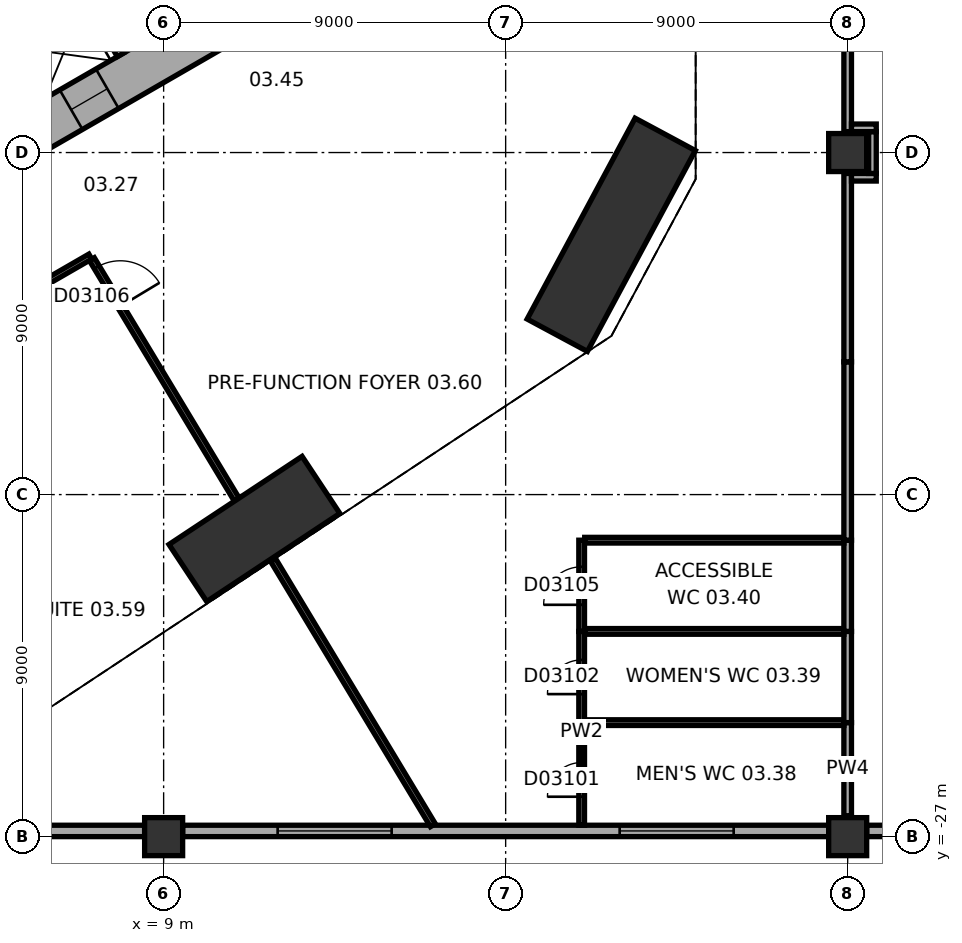
"""IFC4 building model, lengths in metres.
Left out: names, types, materials, properties, quantities, classifications, styles, units other than length and angle.
Written with IfcOpenShell. Run it as: python <this file> out.ifc"""

import sys

from ifc_helpers import new_model, si_unit, direction, frame, frame_2d, origin, origin_2d, place, context, subcontext, project, spatial, rectangle, extrude, element, fill, save


model = new_model("IFC4")
c1 = context("Model", 3, precision=1e-05, world=origin(), true_north=direction((0.0, 1.0)))
c2 = subcontext(c1, "Body", "Model", "MODEL_VIEW")
j1 = project(units=[si_unit("LENGTHUNIT", "METRE"), si_unit("PLANEANGLEUNIT", "RADIAN")], contexts=[c1])
p1 = place(None, origin())
s1 = spatial("IfcSite", under=j1, at=p1, CompositionType="ELEMENT")
p2 = place(p1, origin())
s2 = spatial("IfcBuilding", under=s1, at=p2, CompositionType="ELEMENT")
p3 = place(p2, frame((0.0, 0.0, 21.0)))
s3 = spatial("IfcBuildingStorey", under=s2, at=p3, CompositionType="ELEMENT", Elevation=21.0)
p4 = place(p3, frame((11.389, -18.905, 0.0), z_axis=(0.0, 0.0, 1.0), x_axis=(0.833880042151, 0.551945717714, 0.0)))
e1 = element("IfcColumn", 1, at=p4, inside=s3, PredefinedType="COLUMN", context=c2, shape_type="SweptSolid", body=[
    extrude(rectangle(XDim=4.2, YDim=1.8, at=origin_2d()), origin(), (0.0, 0.0, 1.0), 8.0),
])
p5 = place(p3, frame((20.779, -11.165, 0.0), z_axis=(0.0, 0.0, 1.0), x_axis=(0.473322742071, 0.880889086003, 0.0)))
e2 = element("IfcColumn", 2, at=p5, inside=s3, PredefinedType="COLUMN", context=c2, shape_type="SweptSolid", body=[
    extrude(rectangle(XDim=6.0, YDim=1.8, at=origin_2d()), origin(), (0.0, 0.0, 1.0), 8.0),
])
for number, where, z_axis, x_axis in (
    (3, (9.0, -27.0, 0.0), (0.0, 0.0, 1.0), (1.0, 0.0, 0.0)),
    (4, (27.0, -27.0, 0.0), (0.0, 0.0, 1.0), (1.0, 0.0, 0.0)),
    (5, (27.0, -9.0, 0.0), (0.0, 0.0, 1.0), (1.0, 0.0, 0.0)),
):
    element("IfcColumn", number, at=place(p3, frame(where, z_axis=z_axis, x_axis=x_axis)), inside=s3, PredefinedType="COLUMN", context=c2, shape_type="SweptSolid", body=[
        extrude(rectangle(XDim=1.0, YDim=1.0, at=origin_2d()), origin(), (0.0, 0.0, 1.0), 8.0),
    ])
p6 = place(p3, frame((-0.3, -11.836, 0.0), z_axis=(0.0, 0.0, 1.0), x_axis=(0.866021384402, 0.500006961711, 0.0)))
e6 = element("IfcWall", 6, at=p6, inside=s3, PredefinedType="SHEAR", context=c2, shape_type="SweptSolid", body=[
    extrude(rectangle(XDim=12.355, YDim=1.2, at=frame_2d((6.178, 0.0))), origin(), (0.0, 0.0, 1.0), 8.0),
])
p7 = place(p6, frame((4.128, 0.0, 0.0)))
e7 = element("IfcOpeningElement", 7, at=p7, cuts=e6, PredefinedType="OPENING", context=c2, shape_type="SweptSolid", body=[
    extrude(rectangle(XDim=0.9, YDim=2.1, at=frame_2d((0.45, 1.05))), frame((0.0, 0.61, 0.0), z_axis=(0.0, -1.0, 0.0), x_axis=(1.0, 0.0, 0.0)), (0.0, 0.0, 1.0), 1.22),
])
p8 = place(p6, frame((7.928, 0.0, 0.0)))
e8 = element("IfcOpeningElement", 8, at=p8, cuts=e6, PredefinedType="OPENING", context=c2, shape_type="SweptSolid", body=[
    extrude(rectangle(XDim=1.1, YDim=2.1, at=frame_2d((0.55, 1.05))), frame((0.0, 0.61, 0.0), z_axis=(0.0, -1.0, 0.0), x_axis=(1.0, 0.0, 0.0)), (0.0, 0.0, 1.0), 1.22),
])
p9 = place(p3, frame((-8.5, -26.85, 0.0), z_axis=(0.0, 0.0, 1.0), x_axis=(1.0, 0.0, 0.0)))
e9 = element("IfcWall", 9, at=p9, inside=s3, PredefinedType="STANDARD", context=c2, shape_type="SweptSolid", body=[
    extrude(rectangle(XDim=17.0, YDim=0.3, at=frame_2d((8.5, 0.0))), origin(), (0.0, 0.0, 1.0), 6.5),
])
p10 = place(p9, frame((2.5, 0.0, 1.0)))
e10 = element("IfcOpeningElement", 10, at=p10, cuts=e9, PredefinedType="OPENING", context=c2, shape_type="SweptSolid", body=[
    extrude(rectangle(XDim=3.0, YDim=4.0, at=frame_2d((1.5, 2.0))), frame((0.0, 0.16, 0.0), z_axis=(0.0, -1.0, 0.0), x_axis=(1.0, 0.0, 0.0)), (0.0, 0.0, 1.0), 0.32),
])
p11 = place(p9, frame((11.5, 0.0, 1.0)))
e11 = element("IfcOpeningElement", 11, at=p11, cuts=e9, PredefinedType="OPENING", context=c2, shape_type="SweptSolid", body=[
    extrude(rectangle(XDim=3.0, YDim=4.0, at=frame_2d((1.5, 2.0))), frame((0.0, 0.16, 0.0), z_axis=(0.0, -1.0, 0.0), x_axis=(1.0, 0.0, 0.0)), (0.0, 0.0, 1.0), 0.32),
])
p12 = place(p3, frame((9.5, -26.85, 0.0), z_axis=(0.0, 0.0, 1.0), x_axis=(1.0, 0.0, 0.0)))
e12 = element("IfcWall", 12, at=p12, inside=s3, PredefinedType="STANDARD", context=c2, shape_type="SweptSolid", body=[
    extrude(rectangle(XDim=17.0, YDim=0.3, at=frame_2d((8.5, 0.0))), origin(), (0.0, 0.0, 1.0), 6.5),
])
p13 = place(p12, frame((2.5, 0.0, 1.0)))
e13 = element("IfcOpeningElement", 13, at=p13, cuts=e12, PredefinedType="OPENING", context=c2, shape_type="SweptSolid", body=[
    extrude(rectangle(XDim=3.0, YDim=4.0, at=frame_2d((1.5, 2.0))), frame((0.0, 0.16, 0.0), z_axis=(0.0, -1.0, 0.0), x_axis=(1.0, 0.0, 0.0)), (0.0, 0.0, 1.0), 0.32),
])
p14 = place(p12, frame((11.5, 0.0, 1.0)))
e14 = element("IfcOpeningElement", 14, at=p14, cuts=e12, PredefinedType="OPENING", context=c2, shape_type="SweptSolid", body=[
    extrude(rectangle(XDim=3.0, YDim=4.0, at=frame_2d((1.5, 2.0))), frame((0.0, 0.16, 0.0), z_axis=(0.0, -1.0, 0.0), x_axis=(1.0, 0.0, 0.0)), (0.0, 0.0, 1.0), 0.32),
])
p15 = place(p3, frame((27.5, -26.85, 0.0), z_axis=(0.0, 0.0, 1.0), x_axis=(1.0, 0.0, 0.0)))
e15 = element("IfcWall", 15, at=p15, inside=s3, PredefinedType="STANDARD", context=c2, shape_type="SweptSolid", body=[
    extrude(rectangle(XDim=17.0, YDim=0.3, at=frame_2d((8.5, 0.0))), origin(), (0.0, 0.0, 1.0), 6.5),
])
p16 = place(p15, frame((2.5, 0.0, 1.0)))
e16 = element("IfcOpeningElement", 16, at=p16, cuts=e15, PredefinedType="OPENING", context=c2, shape_type="SweptSolid", body=[
    extrude(rectangle(XDim=3.0, YDim=4.0, at=frame_2d((1.5, 2.0))), frame((0.0, 0.16, 0.0), z_axis=(0.0, -1.0, 0.0), x_axis=(1.0, 0.0, 0.0)), (0.0, 0.0, 1.0), 0.32),
])
p17 = place(p15, frame((11.5, 0.0, 1.0)))
e17 = element("IfcOpeningElement", 17, at=p17, cuts=e15, PredefinedType="OPENING", context=c2, shape_type="SweptSolid", body=[
    extrude(rectangle(XDim=3.0, YDim=4.0, at=frame_2d((1.5, 2.0))), frame((0.0, 0.16, 0.0), z_axis=(0.0, -1.0, 0.0), x_axis=(1.0, 0.0, 0.0)), (0.0, 0.0, 1.0), 0.32),
])
p18 = place(p3, frame((-0.024, -8.559, 0.0), z_axis=(0.0, 0.0, 1.0), x_axis=(0.866026010844, 0.49999894854, 0.0)))
e18 = element("IfcWall", 18, at=p18, inside=s3, PredefinedType="PARTITIONING", context=c2, shape_type="SweptSolid", body=[
    extrude(rectangle(XDim=8.0, YDim=0.2, at=frame_2d((4.0, 0.0))), origin(), (0.0, 0.0, 1.0), 7.7),
])
p19 = place(p3, frame((6.768, -4.522, 0.0), z_axis=(0.0, 0.0, 1.0), x_axis=(0.50002983664, -0.866008176907, 0.0)))
e19 = element("IfcWall", 19, at=p19, inside=s3, PredefinedType="PARTITIONING", context=c2, shape_type="SweptSolid", body=[
    extrude(rectangle(XDim=2.2, YDim=0.2, at=frame_2d((1.1, 0.0))), origin(), (0.0, 0.0, 1.0), 7.7),
])
p20 = place(p3, frame((0.847, -7.767, 0.0), z_axis=(0.0, 0.0, 1.0), x_axis=(0.866027801685, 0.499995846692, 0.0)))
e20 = element("IfcWall", 20, at=p20, inside=s3, PredefinedType="SHEAR", context=c2, shape_type="SweptSolid", body=[
    extrude(rectangle(XDim=7.06, YDim=0.3, at=frame_2d((3.53, 0.0))), origin(), (0.0, 0.0, 1.0), 7.7),
])
p21 = place(p3, frame((20.0, -26.7, 0.0), z_axis=(0.0, 0.0, 1.0), x_axis=(0.0, 1.0, 0.0)))
e21 = element("IfcWall", 21, at=p21, inside=s3, PredefinedType="PARTITIONING", context=c2, shape_type="SweptSolid", body=[
    extrude(rectangle(XDim=2.7, YDim=0.15, at=frame_2d((1.35, 0.0))), origin(), (0.0, 0.0, 1.0), 7.7),
])
p22 = place(p21, frame((0.75, 0.0, 0.0)))
e22 = element("IfcOpeningElement", 22, at=p22, cuts=e21, PredefinedType="OPENING", context=c2, shape_type="SweptSolid", body=[
    extrude(rectangle(XDim=0.9, YDim=2.1, at=frame_2d((0.45, 1.05))), frame((0.0, 0.085, 0.0), z_axis=(0.0, -1.0, 0.0), x_axis=(1.0, 0.0, 0.0)), (0.0, 0.0, 1.0), 0.17),
])
p23 = place(p3, frame((27.0, -26.45, 0.0), z_axis=(0.0, 0.0, 1.0), x_axis=(0.0, 1.0, 0.0)))
e23 = element("IfcWall", 23, at=p23, inside=s3, PredefinedType="PARTITIONING", context=c2, shape_type="SweptSolid", body=[
    extrude(rectangle(XDim=2.45, YDim=0.2, at=frame_2d((1.225, 0.0))), origin(), (0.0, 0.0, 1.0), 6.5),
])
p24 = place(p3, frame((20.0, -24.0, 0.0), z_axis=(0.0, 0.0, 1.0), x_axis=(0.0, 1.0, 0.0)))
e24 = element("IfcWall", 24, at=p24, inside=s3, PredefinedType="PARTITIONING", context=c2, shape_type="SweptSolid", body=[
    extrude(rectangle(XDim=2.4, YDim=0.15, at=frame_2d((1.2, 0.0))), origin(), (0.0, 0.0, 1.0), 7.7),
])
p25 = place(p24, frame((0.75, 0.0, 0.0)))
e25 = element("IfcOpeningElement", 25, at=p25, cuts=e24, PredefinedType="OPENING", context=c2, shape_type="SweptSolid", body=[
    extrude(rectangle(XDim=0.9, YDim=2.1, at=frame_2d((0.45, 1.05))), frame((0.0, 0.085, 0.0), z_axis=(0.0, -1.0, 0.0), x_axis=(1.0, 0.0, 0.0)), (0.0, 0.0, 1.0), 0.17),
])
p26 = place(p3, frame((20.08, -24.0, 0.0), z_axis=(0.0, 0.0, 1.0), x_axis=(1.0, 0.0, 0.0)))
e26 = element("IfcWall", 26, at=p26, inside=s3, PredefinedType="PARTITIONING", context=c2, shape_type="SweptSolid", body=[
    extrude(rectangle(XDim=6.82, YDim=0.15, at=frame_2d((3.41, 0.0))), origin(), (0.0, 0.0, 1.0), 7.7),
])
p27 = place(p3, frame((27.0, -24.0, 0.0), z_axis=(0.0, 0.0, 1.0), x_axis=(0.0, 1.0, 0.0)))
e27 = element("IfcWall", 27, at=p27, inside=s3, PredefinedType="PARTITIONING", context=c2, shape_type="SweptSolid", body=[
    extrude(rectangle(XDim=2.4, YDim=0.2, at=frame_2d((1.2, 0.0))), origin(), (0.0, 0.0, 1.0), 6.5),
])
p28 = place(p3, frame((20.0, -21.6, 0.0), z_axis=(0.0, 0.0, 1.0), x_axis=(0.0, 1.0, 0.0)))
e28 = element("IfcWall", 28, at=p28, inside=s3, PredefinedType="PARTITIONING", context=c2, shape_type="SweptSolid", body=[
    extrude(rectangle(XDim=2.4, YDim=0.15, at=frame_2d((1.2, 0.0))), origin(), (0.0, 0.0, 1.0), 7.7),
])
p29 = place(p28, frame((0.7, 0.0, 0.0)))
e29 = element("IfcOpeningElement", 29, at=p29, cuts=e28, PredefinedType="OPENING", context=c2, shape_type="SweptSolid", body=[
    extrude(rectangle(XDim=1.0, YDim=2.1, at=frame_2d((0.5, 1.05))), frame((0.0, 0.085, 0.0), z_axis=(0.0, -1.0, 0.0), x_axis=(1.0, 0.0, 0.0)), (0.0, 0.0, 1.0), 0.17),
])
p30 = place(p3, frame((20.08, -21.6, 0.0), z_axis=(0.0, 0.0, 1.0), x_axis=(1.0, 0.0, 0.0)))
e30 = element("IfcWall", 30, at=p30, inside=s3, PredefinedType="PARTITIONING", context=c2, shape_type="SweptSolid", body=[
    extrude(rectangle(XDim=6.82, YDim=0.15, at=frame_2d((3.41, 0.0))), origin(), (0.0, 0.0, 1.0), 7.7),
])
p31 = place(p3, frame((27.0, -21.6, 0.0), z_axis=(0.0, 0.0, 1.0), x_axis=(0.0, 1.0, 0.0)))
e31 = element("IfcWall", 31, at=p31, inside=s3, PredefinedType="PARTITIONING", context=c2, shape_type="SweptSolid", body=[
    extrude(rectangle(XDim=2.4, YDim=0.2, at=frame_2d((1.2, 0.0))), origin(), (0.0, 0.0, 1.0), 6.5),
])
p32 = place(p3, frame((11.879, -19.719, 0.0), z_axis=(0.0, 0.0, 1.0), x_axis=(0.516054476578, -0.856555764212, 0.0)))
e32 = element("IfcWall", 32, at=p32, inside=s3, PredefinedType="PARTITIONING", context=c2, shape_type="SweptSolid", body=[
    extrude(rectangle(XDim=8.149, YDim=0.15, at=frame_2d((4.075, 0.0))), origin(), (0.0, 0.0, 1.0), 7.7),
])
p33 = place(p3, frame((20.08, -19.2, 0.0), z_axis=(0.0, 0.0, 1.0), x_axis=(1.0, 0.0, 0.0)))
e33 = element("IfcWall", 33, at=p33, inside=s3, PredefinedType="PARTITIONING", context=c2, shape_type="SweptSolid", body=[
    extrude(rectangle(XDim=6.82, YDim=0.15, at=frame_2d((3.41, 0.0))), origin(), (0.0, 0.0, 1.0), 7.7),
])
p34 = place(p3, frame((27.0, -19.2, 0.0), z_axis=(0.0, 0.0, 1.0), x_axis=(0.0, 1.0, 0.0)))
e34 = element("IfcWall", 34, at=p34, inside=s3, PredefinedType="PARTITIONING", context=c2, shape_type="SweptSolid", body=[
    extrude(rectangle(XDim=4.692, YDim=0.2, at=frame_2d((2.346, 0.0))), origin(), (0.0, 0.0, 1.0), 6.5),
])
p35 = place(p3, frame((10.924, -18.133, 0.0), z_axis=(0.0, 0.0, 1.0), x_axis=(-0.516035715917, 0.856567066784, 0.0)))
e35 = element("IfcWall", 35, at=p35, inside=s3, PredefinedType="PARTITIONING", context=c2, shape_type="SweptSolid", body=[
    extrude(rectangle(XDim=7.387, YDim=0.15, at=frame_2d((3.693, 0.0))), origin(), (0.0, 0.0, 1.0), 7.7),
])
p36 = place(p35, frame((5.937, 0.0, 0.0)))
e36 = element("IfcOpeningElement", 36, at=p36, cuts=e35, PredefinedType="OPENING", context=c2, shape_type="SweptSolid", body=[
    extrude(rectangle(XDim=1.2, YDim=2.1, at=frame_2d((0.6, 1.05))), frame((0.0, 0.085, 0.0), z_axis=(0.0, -1.0, 0.0), x_axis=(1.0, 0.0, 0.0)), (0.0, 0.0, 1.0), 0.17),
])
p37 = place(p3, frame((0.475, -15.545, 0.0), z_axis=(0.0, 0.0, 1.0), x_axis=(0.866021168401, 0.500007335828, 0.0)))
e37 = element("IfcWall", 37, at=p37, inside=s3, PredefinedType="PARTITIONING", context=c2, shape_type="SweptSolid", body=[
    extrude(rectangle(XDim=7.616, YDim=0.15, at=frame_2d((3.808, 0.0))), origin(), (0.0, 0.0, 1.0), 7.7),
])
p38 = place(p3, frame((27.0, -14.508, 0.0), z_axis=(0.0, 0.0, 1.0), x_axis=(0.0, 1.0, 0.0)))
e38 = element("IfcWall", 38, at=p38, inside=s3, PredefinedType="PARTITIONING", context=c2, shape_type="SweptSolid", body=[
    extrude(rectangle(XDim=4.958, YDim=0.2, at=frame_2d((2.479, 0.0))), origin(), (0.0, 0.0, 1.0), 6.5),
])
p39 = place(p3, frame((27.1, -9.65, 0.0), z_axis=(0.0, 0.0, 1.0), x_axis=(1.0, 0.0, 0.0)))
e39 = element("IfcWall", 39, at=p39, inside=s3, PredefinedType="PARTITIONING", context=c2, shape_type="SweptSolid", body=[
    extrude(rectangle(XDim=0.652, YDim=0.2, at=frame_2d((0.326, 0.0))), origin(), (0.0, 0.0, 1.0), 7.7),
])
p40 = place(p3, frame((27.652, -9.55, 0.0), z_axis=(0.0, 0.0, 1.0), x_axis=(0.0, 1.0, 0.0)))
e40 = element("IfcWall", 40, at=p40, inside=s3, PredefinedType="PARTITIONING", context=c2, shape_type="SweptSolid", body=[
    extrude(rectangle(XDim=1.1, YDim=0.2, at=frame_2d((0.55, 0.0))), origin(), (0.0, 0.0, 1.0), 7.7),
])
p41 = place(p3, frame((27.0, -8.45, 0.0), z_axis=(0.0, 0.0, 1.0), x_axis=(0.0, 1.0, 0.0)))
e41 = element("IfcWall", 41, at=p41, inside=s3, PredefinedType="PARTITIONING", context=c2, shape_type="SweptSolid", body=[
    extrude(rectangle(XDim=3.05, YDim=0.2, at=frame_2d((1.525, 0.0))), origin(), (0.0, 0.0, 1.0), 6.5),
])
p42 = place(p3, frame((27.1, -8.35, 0.0), z_axis=(0.0, 0.0, 1.0), x_axis=(1.0, 0.0, 0.0)))
e42 = element("IfcWall", 42, at=p42, inside=s3, PredefinedType="PARTITIONING", context=c2, shape_type="SweptSolid", body=[
    extrude(rectangle(XDim=0.652, YDim=0.2, at=frame_2d((0.326, 0.0))), origin(), (0.0, 0.0, 1.0), 7.7),
])
p43 = place(p13, origin())
e43 = element("IfcWindow", 43, at=p43, inside=s3, PartitioningType="SINGLE_PANEL", PredefinedType="WINDOW", context=c2, shape_type="SweptSolid", body=[
    extrude(rectangle(XDim=3.0, YDim=4.0, at=frame_2d((1.5, 2.0))), frame((0.0, 0.03, 0.0), z_axis=(0.0, -1.0, 0.0), x_axis=(1.0, 0.0, 0.0)), (0.0, 0.0, 1.0), 0.06),
])
fill(e13, e43)
p44 = place(p14, origin())
e44 = element("IfcWindow", 44, at=p44, inside=s3, PartitioningType="SINGLE_PANEL", PredefinedType="WINDOW", context=c2, shape_type="SweptSolid", body=[
    extrude(rectangle(XDim=3.0, YDim=4.0, at=frame_2d((1.5, 2.0))), frame((0.0, 0.03, 0.0), z_axis=(0.0, -1.0, 0.0), x_axis=(1.0, 0.0, 0.0)), (0.0, 0.0, 1.0), 0.06),
])
fill(e14, e44)
p45 = place(p8, origin())
e45 = element("IfcDoor", 45, at=p45, inside=s3, OperationType="DOUBLE_DOOR_SLIDING", PredefinedType="DOOR", context=c2, shape_type="SweptSolid", body=[
    extrude(rectangle(XDim=1.1, YDim=2.1, at=frame_2d((0.55, 1.05))), frame((0.0, 0.025, 0.0), z_axis=(0.0, -1.0, 0.0), x_axis=(1.0, 0.0, 0.0)), (0.0, 0.0, 1.0), 0.05),
])
fill(e8, e45)
p46 = place(p22, origin())
e46 = element("IfcDoor", 46, at=p46, inside=s3, OperationType="SINGLE_SWING_LEFT", PredefinedType="DOOR", context=c2, shape_type="SweptSolid", body=[
    extrude(rectangle(XDim=0.9, YDim=2.1, at=frame_2d((0.45, 1.05))), frame((0.0, 0.025, 0.0), z_axis=(0.0, -1.0, 0.0), x_axis=(1.0, 0.0, 0.0)), (0.0, 0.0, 1.0), 0.05),
])
fill(e22, e46)
p47 = place(p25, origin())
e47 = element("IfcDoor", 47, at=p47, inside=s3, OperationType="SINGLE_SWING_LEFT", PredefinedType="DOOR", context=c2, shape_type="SweptSolid", body=[
    extrude(rectangle(XDim=0.9, YDim=2.1, at=frame_2d((0.45, 1.05))), frame((0.0, 0.025, 0.0), z_axis=(0.0, -1.0, 0.0), x_axis=(1.0, 0.0, 0.0)), (0.0, 0.0, 1.0), 0.05),
])
fill(e25, e47)
p48 = place(p29, origin())
e48 = element("IfcDoor", 48, at=p48, inside=s3, OperationType="SINGLE_SWING_LEFT", PredefinedType="DOOR", context=c2, shape_type="SweptSolid", body=[
    extrude(rectangle(XDim=1.0, YDim=2.1, at=frame_2d((0.5, 1.05))), frame((0.0, 0.025, 0.0), z_axis=(0.0, -1.0, 0.0), x_axis=(1.0, 0.0, 0.0)), (0.0, 0.0, 1.0), 0.05),
])
fill(e29, e48)
p49 = place(p36, origin())
e49 = element("IfcDoor", 49, at=p49, inside=s3, OperationType="SINGLE_SWING_LEFT", PredefinedType="DOOR", context=c2, shape_type="SweptSolid", body=[
    extrude(rectangle(XDim=1.2, YDim=2.1, at=frame_2d((0.6, 1.05))), frame((0.0, 0.025, 0.0), z_axis=(0.0, -1.0, 0.0), x_axis=(1.0, 0.0, 0.0)), (0.0, 0.0, 1.0), 0.05),
])
fill(e36, e49)
save(model, sys.argv[1])
